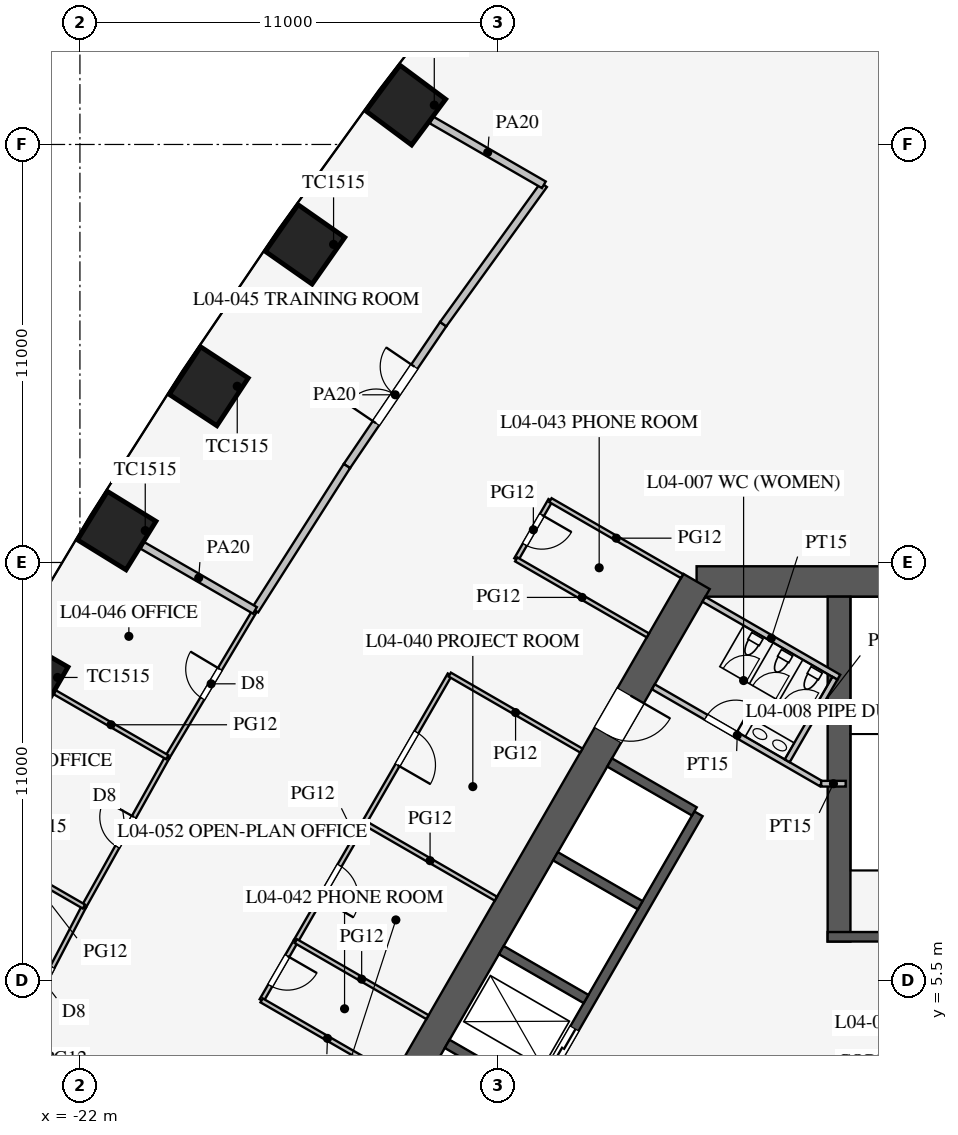
"""IFC4 building model, lengths in metres.
Left out: names, types, materials, properties, quantities, classifications, styles, units other than length and angle.
Written with IfcOpenShell. Run it as: python <this file> out.ifc"""

import sys

from ifc_helpers import new_model, si_unit, direction, frame, frame_2d, origin, origin_2d, place, context, subcontext, project, spatial, rectangle, extrude, element, fill, save


model = new_model("IFC4")
c1 = context("Model", 3, precision=1e-05, world=origin(), true_north=direction((0.0, 1.0)))
c2 = subcontext(c1, "Body", "Model", "MODEL_VIEW")
j1 = project(units=[si_unit("LENGTHUNIT", "METRE"), si_unit("PLANEANGLEUNIT", "RADIAN")], contexts=[c1])
p1 = place(None, origin())
s1 = spatial("IfcSite", under=j1, at=p1, CompositionType="ELEMENT")
p2 = place(p1, origin())
s2 = spatial("IfcBuilding", under=s1, at=p2, CompositionType="ELEMENT")
p3 = place(p2, frame((0.0, 0.0, 20.7)))
s3 = spatial("IfcBuildingStorey", under=s2, at=p3, CompositionType="ELEMENT", Elevation=20.7)
for number, where, z_axis, x_axis in (
    (1, (-13.426, 28.536, 0.0), (0.0, 0.0, 1.0), (-0.597, -0.802, 0.0)),
    (2, (-16.076, 24.87, 0.0), (0.0, 0.0, 1.0), (-0.574, -0.819, 0.0)),
    (3, (-18.611, 21.137, 0.0), (0.0, 0.0, 1.0), (-0.549, -0.836, 0.0)),
    (4, (-21.031, 17.339, 0.0), (0.0, 0.0, 1.0), (-0.525, -0.851, 0.0)),
    (5, (-23.338, 13.474, 0.0), (0.0, 0.0, 1.0), (-0.5, -0.866, 0.0)),
):
    element("IfcColumn", number, at=place(p3, frame(where, z_axis=z_axis, x_axis=x_axis)), inside=s3, PredefinedType="COLUMN", context=c2, shape_type="SweptSolid", body=[
        extrude(rectangle(XDim=1.5, YDim=1.5, at=origin_2d()), origin(), (0.0, 0.0, 1.0), 4.2),
    ])
p4 = place(p3, frame((5.773, 16.0, 0.0), z_axis=(0.0, 0.0, 1.0), x_axis=(-1.0, 0.0, 0.0)))
e6 = element("IfcWall", 6, at=p4, inside=s3, PredefinedType="SHEAR", context=c2, shape_type="SweptSolid", body=[
    extrude(rectangle(XDim=11.547, YDim=0.8, at=frame_2d((5.773, 0.0))), origin(), (0.0, 0.0, 1.0), 4.2),
])
p5 = place(p3, frame((-5.773, 16.0, 0.0), z_axis=(0.0, 0.0, 1.0), x_axis=(-0.500002442456, -0.866023993627, 0.0)))
e7 = element("IfcWall", 7, at=p5, inside=s3, PredefinedType="SHEAR", context=c2, shape_type="SweptSolid", body=[
    extrude(rectangle(XDim=21.939, YDim=0.8, at=frame_2d((10.97, 0.0))), origin(), (0.0, 0.0, 1.0), 4.2),
])
p6 = place(p5, frame((17.27, 0.0, 0.0)))
e8 = element("IfcOpeningElement", 8, at=p6, cuts=e7, PredefinedType="OPENING", context=c2, shape_type="SweptSolid", body=[
    extrude(rectangle(XDim=1.2, YDim=2.1, at=frame_2d((0.6, 1.05))), frame((0.0, 0.41, 0.0), z_axis=(0.0, -1.0, 0.0), x_axis=(1.0, 0.0, 0.0)), (0.0, 0.0, 1.0), 0.82),
])
p7 = place(p5, frame((3.47, 0.0, 0.0)))
e9 = element("IfcOpeningElement", 9, at=p7, cuts=e7, PredefinedType="OPENING", context=c2, shape_type="SweptSolid", body=[
    extrude(rectangle(XDim=1.2, YDim=2.1, at=frame_2d((0.6, 1.05))), frame((0.0, 0.41, 0.0), z_axis=(0.0, -1.0, 0.0), x_axis=(1.0, 0.0, 0.0)), (0.0, 0.0, 1.0), 0.82),
])
p8 = place(p3, frame((-5.724, 9.886, 0.0), z_axis=(0.0, 0.0, 1.0), x_axis=(-0.500001763848, -0.866024385424, 0.0)))
e10 = element("IfcWall", 10, at=p8, inside=s3, PredefinedType="SHEAR", context=c2, shape_type="SweptSolid", body=[
    extrude(rectangle(XDim=11.4, YDim=0.25, at=frame_2d((5.7, 0.0))), origin(), (0.0, 0.0, 1.0), 4.2),
])
p9 = place(p8, frame((6.525, 0.0, 0.0)))
e11 = element("IfcOpeningElement", 11, at=p9, cuts=e10, PredefinedType="OPENING", context=c2, shape_type="SweptSolid", body=[
    extrude(rectangle(XDim=1.2, YDim=2.2, at=frame_2d((0.6, 1.1))), frame((0.0, 0.135, 0.0), z_axis=(0.0, -1.0, 0.0), x_axis=(1.0, 0.0, 0.0)), (0.0, 0.0, 1.0), 0.27),
])
p10 = place(p8, frame((9.375, 0.0, 0.0)))
e12 = element("IfcOpeningElement", 12, at=p10, cuts=e10, PredefinedType="OPENING", context=c2, shape_type="SweptSolid", body=[
    extrude(rectangle(XDim=1.2, YDim=2.2, at=frame_2d((0.6, 1.1))), frame((0.0, 0.135, 0.0), z_axis=(0.0, -1.0, 0.0), x_axis=(1.0, 0.0, 0.0)), (0.0, 0.0, 1.0), 0.27),
])
p11 = place(p3, frame((-5.832, 9.949, 0.0), z_axis=(0.0, 0.0, 1.0), x_axis=(-0.866029291668, 0.499993265928, 0.0)))
e13 = element("IfcWall", 13, at=p11, inside=s3, PredefinedType="SHEAR", context=c2, shape_type="SweptSolid", body=[
    extrude(rectangle(XDim=2.575, YDim=0.25, at=frame_2d((1.288, 0.0))), origin(), (0.0, 0.0, 1.0), 4.2),
])
for number, where, z_axis, x_axis in (
    (14, (-7.257, 7.481, 0.0), (0.0, 0.0, 1.0), (-0.866, 0.5, 0.0)),
    (15, (-8.682, 5.012, 0.0), (0.0, 0.0, 1.0), (-0.866, 0.5, 0.0)),
    (16, (-10.107, 2.544, 0.0), (0.0, 0.0, 1.0), (-0.866, 0.5, 0.0)),
):
    element("IfcWall", number, at=place(p3, frame(where, z_axis=z_axis, x_axis=x_axis)), inside=s3, PredefinedType="SHEAR", context=c2, shape_type="SweptSolid", body=[
        extrude(rectangle(XDim=2.575, YDim=0.25, at=frame_2d((1.288, 0.0))), origin(), (0.0, 0.0, 1.0), 4.2),
    ])
p12 = place(p3, frame((-2.025, 6.525, 0.0), z_axis=(0.0, 0.0, 1.0), x_axis=(0.0, 1.0, 0.0)))
e17 = element("IfcWall", 17, at=p12, inside=s3, PredefinedType="SHEAR", context=c2, shape_type="SweptSolid", body=[
    extrude(rectangle(XDim=9.075, YDim=0.6, at=frame_2d((4.538, 0.0))), origin(), (0.0, 0.0, 1.0), 4.2),
])
p13 = place(p3, frame((2.325, 6.65, 0.0), z_axis=(0.0, 0.0, 1.0), x_axis=(-1.0, 0.0, 0.0)))
e18 = element("IfcWall", 18, at=p13, inside=s3, PredefinedType="SHEAR", context=c2, shape_type="SweptSolid", body=[
    extrude(rectangle(XDim=4.65, YDim=0.25, at=frame_2d((2.325, 0.0))), origin(), (0.0, 0.0, 1.0), 4.2),
])
p14 = place(p13, frame((1.525, 0.0, 0.0)))
e19 = element("IfcOpeningElement", 19, at=p14, cuts=e18, PredefinedType="OPENING", context=c2, shape_type="SweptSolid", body=[
    extrude(rectangle(XDim=1.6, YDim=2.1, at=frame_2d((0.8, 1.05))), frame((0.0, 0.135, 0.0), z_axis=(0.0, -1.0, 0.0), x_axis=(1.0, 0.0, 0.0)), (0.0, 0.0, 1.0), 0.27),
])
p15 = place(p3, frame((-2.495, 10.678, 0.0), z_axis=(0.0, 0.0, 1.0), x_axis=(-0.86602216432, 0.500005610874, 0.0)))
e20 = element("IfcWall", 20, at=p15, inside=s3, PredefinedType="PARTITIONING", context=c2, shape_type="SweptSolid", body=[
    extrude(rectangle(XDim=5.1, YDim=0.15, at=frame_2d((2.55, 0.0))), origin(), (0.0, 0.0, 1.0), 4.0),
])
p16 = place(p15, frame((2.6, 0.0, 0.0)))
e21 = element("IfcOpeningElement", 21, at=p16, cuts=e20, PredefinedType="OPENING", context=c2, shape_type="SweptSolid", body=[
    extrude(rectangle(XDim=0.9, YDim=2.1, at=frame_2d((0.45, 1.05))), frame((0.0, 0.085, 0.0), z_axis=(0.0, -1.0, 0.0), x_axis=(1.0, 0.0, 0.0)), (0.0, 0.0, 1.0), 0.17),
])
p17 = place(p3, frame((-2.495, 10.678, 0.0), z_axis=(0.0, 0.0, 1.0), x_axis=(1.0, 0.0, 0.0)))
e22 = element("IfcWall", 22, at=p17, inside=s3, PredefinedType="PARTITIONING", context=c2, shape_type="SweptSolid", body=[
    extrude(rectangle(XDim=0.645, YDim=0.15, at=frame_2d((0.323, 0.0))), origin(), (0.0, 0.0, 1.0), 4.0),
])
p18 = place(p3, frame((-2.031, 13.482, 0.0), z_axis=(0.0, 0.0, 1.0), x_axis=(-0.866050731258, 0.499956128963, 0.0)))
e23 = element("IfcWall", 23, at=p18, inside=s3, PredefinedType="PARTITIONING", context=c2, shape_type="SweptSolid", body=[
    extrude(rectangle(XDim=4.1, YDim=0.15, at=frame_2d((2.05, 0.0))), origin(), (0.0, 0.0, 1.0), 4.0),
])
p19 = place(p3, frame((-3.389, 11.281, 0.0), z_axis=(0.0, 0.0, 1.0), x_axis=(0.499989096993, 0.866031698547, 0.0)))
e24 = element("IfcWall", 24, at=p19, inside=s3, PredefinedType="PARTITIONING", context=c2, shape_type="SweptSolid", body=[
    extrude(rectangle(XDim=2.51, YDim=0.15, at=frame_2d((1.255, 0.0))), origin(), (0.0, 0.0, 1.0), 4.0),
])
p20 = place(p3, frame((-16.319, 6.535, 0.0), z_axis=(0.0, 0.0, 1.0), x_axis=(-0.499961193289, -0.866047807691, 0.0)))
e25 = element("IfcWall", 25, at=p20, inside=s3, PredefinedType="PARTITIONING", context=c2, shape_type="SweptSolid", body=[
    extrude(rectangle(XDim=1.8, YDim=0.12, at=frame_2d((0.9, 0.0))), origin(), (0.0, 0.0, 1.0), 2.9),
])
p21 = place(p20, frame((0.45, 0.0, 0.15)))
e26 = element("IfcOpeningElement", 26, at=p21, cuts=e25, PredefinedType="OPENING", context=c2, shape_type="SweptSolid", body=[
    extrude(rectangle(XDim=0.9, YDim=2.1, at=frame_2d((0.45, 1.05))), frame((0.0, 0.07, 0.0), z_axis=(0.0, -1.0, 0.0), x_axis=(1.0, 0.0, 0.0)), (0.0, 0.0, 1.0), 0.14),
])
p22 = place(p3, frame((-14.519, 9.653, 0.0), z_axis=(0.0, 0.0, 1.0), x_axis=(-0.500012057535, -0.866018442252, 0.0)))
e27 = element("IfcWall", 27, at=p22, inside=s3, PredefinedType="PARTITIONING", context=c2, shape_type="SweptSolid", body=[
    extrude(rectangle(XDim=3.6, YDim=0.12, at=frame_2d((1.8, 0.0))), origin(), (0.0, 0.0, 1.0), 2.9),
])
p23 = place(p22, frame((1.3, 0.0, 0.15)))
e28 = element("IfcOpeningElement", 28, at=p23, cuts=e27, PredefinedType="OPENING", context=c2, shape_type="SweptSolid", body=[
    extrude(rectangle(XDim=1.0, YDim=2.1, at=frame_2d((0.5, 1.05))), frame((0.0, 0.07, 0.0), z_axis=(0.0, -1.0, 0.0), x_axis=(1.0, 0.0, 0.0)), (0.0, 0.0, 1.0), 0.14),
])
p24 = place(p3, frame((-9.619, 18.14, 0.0), z_axis=(0.0, 0.0, 1.0), x_axis=(-0.499961193289, -0.866047807691, 0.0)))
e29 = element("IfcWall", 29, at=p24, inside=s3, PredefinedType="PARTITIONING", context=c2, shape_type="SweptSolid", body=[
    extrude(rectangle(XDim=1.8, YDim=0.12, at=frame_2d((0.9, 0.0))), origin(), (0.0, 0.0, 1.0), 2.9),
])
p25 = place(p24, frame((0.45, 0.0, 0.15)))
e30 = element("IfcOpeningElement", 30, at=p25, cuts=e29, PredefinedType="OPENING", context=c2, shape_type="SweptSolid", body=[
    extrude(rectangle(XDim=0.9, YDim=2.1, at=frame_2d((0.45, 1.05))), frame((0.0, 0.07, 0.0), z_axis=(0.0, -1.0, 0.0), x_axis=(1.0, 0.0, 0.0)), (0.0, 0.0, 1.0), 0.14),
])
p26 = place(p3, frame((-12.269, 13.55, 0.0), z_axis=(0.0, 0.0, 1.0), x_axis=(-0.499990139034, -0.866031096941, 0.0)))
e31 = element("IfcWall", 31, at=p26, inside=s3, PredefinedType="PARTITIONING", context=c2, shape_type="SweptSolid", body=[
    extrude(rectangle(XDim=4.5, YDim=0.12, at=frame_2d((2.25, 0.0))), origin(), (0.0, 0.0, 1.0), 2.9),
])
p27 = place(p26, frame((1.75, 0.0, 0.15)))
e32 = element("IfcOpeningElement", 32, at=p27, cuts=e31, PredefinedType="OPENING", context=c2, shape_type="SweptSolid", body=[
    extrude(rectangle(XDim=1.0, YDim=2.1, at=frame_2d((0.5, 1.05))), frame((0.0, 0.07, 0.0), z_axis=(0.0, -1.0, 0.0), x_axis=(1.0, 0.0, 0.0)), (0.0, 0.0, 1.0), 0.14),
])
for number, where, z_axis, x_axis in (
    (33, (-12.855, 4.535, 0.0), (0.0, 0.0, 1.0), (-0.866, 0.5, 0.0)),
    (34, (-13.755, 2.976, 0.0), (0.0, 0.0, 1.0), (-0.866, 0.5, 0.0)),
    (35, (-11.055, 7.653, 0.0), (0.0, 0.0, 1.0), (-0.866, 0.5, 0.0)),
    (36, (-6.155, 16.14, 0.0), (0.0, 0.0, 1.0), (-0.866, 0.5, 0.0)),
    (37, (-8.805, 11.55, 0.0), (0.0, 0.0, 1.0), (-0.866, 0.5, 0.0)),
    (38, (-7.055, 14.581, 0.0), (0.0, 0.0, 1.0), (-0.866, 0.5, 0.0)),
):
    element("IfcWall", number, at=place(p3, frame(where, z_axis=z_axis, x_axis=x_axis)), inside=s3, PredefinedType="PARTITIONING", context=c2, shape_type="SweptSolid", body=[
        extrude(rectangle(XDim=4.0, YDim=0.12, at=frame_2d((2.0, 0.0))), origin(), (0.0, 0.0, 1.0), 2.9),
    ])
p28 = place(p3, frame((-19.701, 11.374, 0.0), z_axis=(0.0, 0.0, 1.0), x_axis=(-0.487415216275, -0.87317031955, 0.0)))
e39 = element("IfcWall", 39, at=p28, inside=s3, PredefinedType="PARTITIONING", context=c2, shape_type="SweptSolid", body=[
    extrude(rectangle(XDim=4.5, YDim=0.12, at=frame_2d((2.25, 0.0))), origin(), (0.0, 0.0, 1.0), 2.9),
])
p29 = place(p28, frame((1.8, 0.0, 0.15)))
e40 = element("IfcOpeningElement", 40, at=p29, cuts=e39, PredefinedType="OPENING", context=c2, shape_type="SweptSolid", body=[
    extrude(rectangle(XDim=0.9, YDim=2.1, at=frame_2d((0.45, 1.05))), frame((0.0, 0.07, 0.0), z_axis=(0.0, -1.0, 0.0), x_axis=(1.0, 0.0, 0.0)), (0.0, 0.0, 1.0), 0.14),
])
p30 = place(p3, frame((-21.895, 7.445, 0.0), z_axis=(0.0, 0.0, 1.0), x_axis=(-0.461810056307, -0.886978845235, 0.0)))
e41 = element("IfcWall", 41, at=p30, inside=s3, PredefinedType="PARTITIONING", context=c2, shape_type="SweptSolid", body=[
    extrude(rectangle(XDim=4.504, YDim=0.12, at=frame_2d((2.252, 0.0))), origin(), (0.0, 0.0, 1.0), 2.9),
])
p31 = place(p30, frame((1.8, 0.0, 0.15)))
e42 = element("IfcOpeningElement", 42, at=p31, cuts=e41, PredefinedType="OPENING", context=c2, shape_type="SweptSolid", body=[
    extrude(rectangle(XDim=0.9, YDim=2.1, at=frame_2d((0.45, 1.05))), frame((0.0, 0.07, 0.0), z_axis=(0.0, -1.0, 0.0), x_axis=(1.0, 0.0, 0.0)), (0.0, 0.0, 1.0), 0.14),
])
p32 = place(p3, frame((-12.441, 22.771, 0.0), z_axis=(0.0, 0.0, 1.0), x_axis=(-0.561512004239, -0.827468591002, 0.0)))
e43 = element("IfcWall", 43, at=p32, inside=s3, PredefinedType="PARTITIONING", context=c2, shape_type="SweptSolid", body=[
    extrude(rectangle(XDim=4.512, YDim=0.2, at=frame_2d((2.256, 0.0))), origin(), (0.0, 0.0, 1.0), 2.9),
])
p33 = place(p32, frame((1.35, 0.0, 0.15)))
e44 = element("IfcOpeningElement", 44, at=p33, cuts=e43, PredefinedType="OPENING", context=c2, shape_type="SweptSolid", body=[
    extrude(rectangle(XDim=1.8, YDim=2.1, at=frame_2d((0.9, 1.05))), frame((0.0, 0.11, 0.0), z_axis=(0.0, -1.0, 0.0), x_axis=(1.0, 0.0, 0.0)), (0.0, 0.0, 1.0), 0.22),
])
p34 = place(p3, frame((-9.793, 26.439, 0.0), z_axis=(0.0, 0.0, 1.0), x_axis=(-0.585376255171, -0.810761765183, 0.0)))
e45 = element("IfcWall", 45, at=p34, inside=s3, PredefinedType="PARTITIONING", context=c2, shape_type="SweptSolid", body=[
    extrude(rectangle(XDim=4.523, YDim=0.2, at=frame_2d((2.262, 0.0))), origin(), (0.0, 0.0, 1.0), 2.9),
])
p35 = place(p3, frame((-17.395, 15.239, 0.0), z_axis=(0.0, 0.0, 1.0), x_axis=(-0.512483962191, -0.858696796604, 0.0)))
e46 = element("IfcWall", 46, at=p35, inside=s3, PredefinedType="PARTITIONING", context=c2, shape_type="SweptSolid", body=[
    extrude(rectangle(XDim=4.5, YDim=0.12, at=frame_2d((2.25, 0.0))), origin(), (0.0, 0.0, 1.0), 2.9),
])
p36 = place(p35, frame((1.8, 0.0, 0.15)))
e47 = element("IfcOpeningElement", 47, at=p36, cuts=e46, PredefinedType="OPENING", context=c2, shape_type="SweptSolid", body=[
    extrude(rectangle(XDim=0.9, YDim=2.1, at=frame_2d((0.45, 1.05))), frame((0.0, 0.07, 0.0), z_axis=(0.0, -1.0, 0.0), x_axis=(1.0, 0.0, 0.0)), (0.0, 0.0, 1.0), 0.14),
])
p37 = place(p3, frame((-14.975, 19.038, 0.0), z_axis=(0.0, 0.0, 1.0), x_axis=(-0.537243691336, -0.843427066272, 0.0)))
e48 = element("IfcWall", 48, at=p37, inside=s3, PredefinedType="PARTITIONING", context=c2, shape_type="SweptSolid", body=[
    extrude(rectangle(XDim=4.504, YDim=0.2, at=frame_2d((2.252, 0.0))), origin(), (0.0, 0.0, 1.0), 2.9),
])
p38 = place(p3, frame((-19.701, 11.374, 0.0), z_axis=(0.0, 0.0, 1.0), x_axis=(-0.866007273829, 0.50003140069, 0.0)))
e49 = element("IfcWall", 49, at=p38, inside=s3, PredefinedType="PARTITIONING", context=c2, shape_type="SweptSolid", body=[
    extrude(rectangle(XDim=3.42, YDim=0.12, at=frame_2d((1.71, 0.0))), origin(), (0.0, 0.0, 1.0), 2.9),
])
p39 = place(p3, frame((-21.895, 7.445, 0.0), z_axis=(0.0, 0.0, 1.0), x_axis=(-0.866015553834, 0.500017060227, 0.0)))
e50 = element("IfcWall", 50, at=p39, inside=s3, PredefinedType="PARTITIONING", context=c2, shape_type="SweptSolid", body=[
    extrude(rectangle(XDim=3.419, YDim=0.12, at=frame_2d((1.71, 0.0))), origin(), (0.0, 0.0, 1.0), 2.9),
])
p40 = place(p3, frame((-9.793, 26.439, 0.0), z_axis=(0.0, 0.0, 1.0), x_axis=(-0.866040105854, 0.499974534403, 0.0)))
e51 = element("IfcWall", 51, at=p40, inside=s3, PredefinedType="PARTITIONING", context=c2, shape_type="SweptSolid", body=[
    extrude(rectangle(XDim=3.409, YDim=0.2, at=frame_2d((1.705, 0.0))), origin(), (0.0, 0.0, 1.0), 2.9),
])
p41 = place(p3, frame((-17.395, 15.239, 0.0), z_axis=(0.0, 0.0, 1.0), x_axis=(-0.866015553834, 0.500017060227, 0.0)))
e52 = element("IfcWall", 52, at=p41, inside=s3, PredefinedType="PARTITIONING", context=c2, shape_type="SweptSolid", body=[
    extrude(rectangle(XDim=3.419, YDim=0.2, at=frame_2d((1.71, 0.0))), origin(), (0.0, 0.0, 1.0), 2.9),
])
p42 = place(p16, frame((0.9, 0.0, 0.0), z_axis=(0.0, 0.0, 1.0), x_axis=(-1.0, 0.0, 0.0)))
e53 = element("IfcDoor", 53, at=p42, inside=s3, OperationType="SINGLE_SWING_RIGHT", PredefinedType="DOOR", context=c2, shape_type="SweptSolid", body=[
    extrude(rectangle(XDim=0.9, YDim=2.1, at=frame_2d((0.45, 1.05))), frame((0.0, 0.025, 0.0), z_axis=(0.0, -1.0, 0.0), x_axis=(1.0, 0.0, 0.0)), (0.0, 0.0, 1.0), 0.05),
])
fill(e21, e53)
p43 = place(p7, origin())
e54 = element("IfcDoor", 54, at=p43, inside=s3, OperationType="SINGLE_SWING_LEFT", PredefinedType="DOOR", context=c2, shape_type="SweptSolid", body=[
    extrude(rectangle(XDim=1.2, YDim=2.1, at=frame_2d((0.6, 1.05))), frame((0.0, 0.025, 0.0), z_axis=(0.0, -1.0, 0.0), x_axis=(1.0, 0.0, 0.0)), (0.0, 0.0, 1.0), 0.05),
])
fill(e9, e54)
p44 = place(p27, origin())
e55 = element("IfcDoor", 55, at=p44, inside=s3, OperationType="SINGLE_SWING_RIGHT", PredefinedType="DOOR", context=c2, shape_type="SweptSolid", body=[
    extrude(rectangle(XDim=1.0, YDim=2.1, at=frame_2d((0.5, 1.05))), frame((0.0, 0.025, 0.0), z_axis=(0.0, -1.0, 0.0), x_axis=(1.0, 0.0, 0.0)), (0.0, 0.0, 1.0), 0.05),
])
fill(e32, e55)
p45 = place(p23, origin())
e56 = element("IfcDoor", 56, at=p45, inside=s3, OperationType="SINGLE_SWING_RIGHT", PredefinedType="DOOR", context=c2, shape_type="SweptSolid", body=[
    extrude(rectangle(XDim=1.0, YDim=2.1, at=frame_2d((0.5, 1.05))), frame((0.0, 0.025, 0.0), z_axis=(0.0, -1.0, 0.0), x_axis=(1.0, 0.0, 0.0)), (0.0, 0.0, 1.0), 0.05),
])
fill(e28, e56)
p46 = place(p21, origin())
e57 = element("IfcDoor", 57, at=p46, inside=s3, OperationType="SINGLE_SWING_LEFT", PredefinedType="DOOR", context=c2, shape_type="SweptSolid", body=[
    extrude(rectangle(XDim=0.9, YDim=2.1, at=frame_2d((0.45, 1.05))), frame((0.0, 0.025, 0.0), z_axis=(0.0, -1.0, 0.0), x_axis=(1.0, 0.0, 0.0)), (0.0, 0.0, 1.0), 0.05),
])
fill(e26, e57)
p47 = place(p25, origin())
e58 = element("IfcDoor", 58, at=p47, inside=s3, OperationType="SINGLE_SWING_LEFT", PredefinedType="DOOR", context=c2, shape_type="SweptSolid", body=[
    extrude(rectangle(XDim=0.9, YDim=2.1, at=frame_2d((0.45, 1.05))), frame((0.0, 0.025, 0.0), z_axis=(0.0, -1.0, 0.0), x_axis=(1.0, 0.0, 0.0)), (0.0, 0.0, 1.0), 0.05),
])
fill(e30, e58)
p48 = place(p33, frame((1.8, 0.0, 0.0), z_axis=(0.0, 0.0, 1.0), x_axis=(-1.0, 0.0, 0.0)))
e59 = element("IfcDoor", 59, at=p48, inside=s3, OperationType="DOUBLE_DOOR_SINGLE_SWING", PredefinedType="DOOR", context=c2, shape_type="SweptSolid", body=[
    extrude(rectangle(XDim=1.8, YDim=2.1, at=frame_2d((0.9, 1.05))), frame((0.0, 0.025, 0.0), z_axis=(0.0, -1.0, 0.0), x_axis=(1.0, 0.0, 0.0)), (0.0, 0.0, 1.0), 0.05),
])
fill(e44, e59)
p49 = place(p36, frame((0.9, 0.0, 0.0), z_axis=(0.0, 0.0, 1.0), x_axis=(-1.0, 0.0, 0.0)))
e60 = element("IfcDoor", 60, at=p49, inside=s3, OperationType="SINGLE_SWING_RIGHT", PredefinedType="DOOR", context=c2, shape_type="SweptSolid", body=[
    extrude(rectangle(XDim=0.9, YDim=2.1, at=frame_2d((0.45, 1.05))), frame((0.0, 0.025, 0.0), z_axis=(0.0, -1.0, 0.0), x_axis=(1.0, 0.0, 0.0)), (0.0, 0.0, 1.0), 0.05),
])
fill(e47, e60)
p50 = place(p29, frame((0.9, 0.0, 0.0), z_axis=(0.0, 0.0, 1.0), x_axis=(-1.0, 0.0, 0.0)))
e61 = element("IfcDoor", 61, at=p50, inside=s3, OperationType="SINGLE_SWING_RIGHT", PredefinedType="DOOR", context=c2, shape_type="SweptSolid", body=[
    extrude(rectangle(XDim=0.9, YDim=2.1, at=frame_2d((0.45, 1.05))), frame((0.0, 0.025, 0.0), z_axis=(0.0, -1.0, 0.0), x_axis=(1.0, 0.0, 0.0)), (0.0, 0.0, 1.0), 0.05),
])
fill(e40, e61)
p51 = place(p31, frame((0.9, 0.0, 0.0), z_axis=(0.0, 0.0, 1.0), x_axis=(-1.0, 0.0, 0.0)))
e62 = element("IfcDoor", 62, at=p51, inside=s3, OperationType="SINGLE_SWING_RIGHT", PredefinedType="DOOR", context=c2, shape_type="SweptSolid", body=[
    extrude(rectangle(XDim=0.9, YDim=2.1, at=frame_2d((0.45, 1.05))), frame((0.0, 0.025, 0.0), z_axis=(0.0, -1.0, 0.0), x_axis=(1.0, 0.0, 0.0)), (0.0, 0.0, 1.0), 0.05),
])
fill(e42, e62)
p52 = place(p9, origin())
e63 = element("IfcDoor", 63, at=p52, inside=s3, OperationType="DOUBLE_DOOR_SLIDING", PredefinedType="DOOR", context=c2, shape_type="SweptSolid", body=[
    extrude(rectangle(XDim=1.2, YDim=2.2, at=frame_2d((0.6, 1.1))), frame((0.0, 0.025, 0.0), z_axis=(0.0, -1.0, 0.0), x_axis=(1.0, 0.0, 0.0)), (0.0, 0.0, 1.0), 0.05),
])
fill(e11, e63)
save(model, sys.argv[1])
